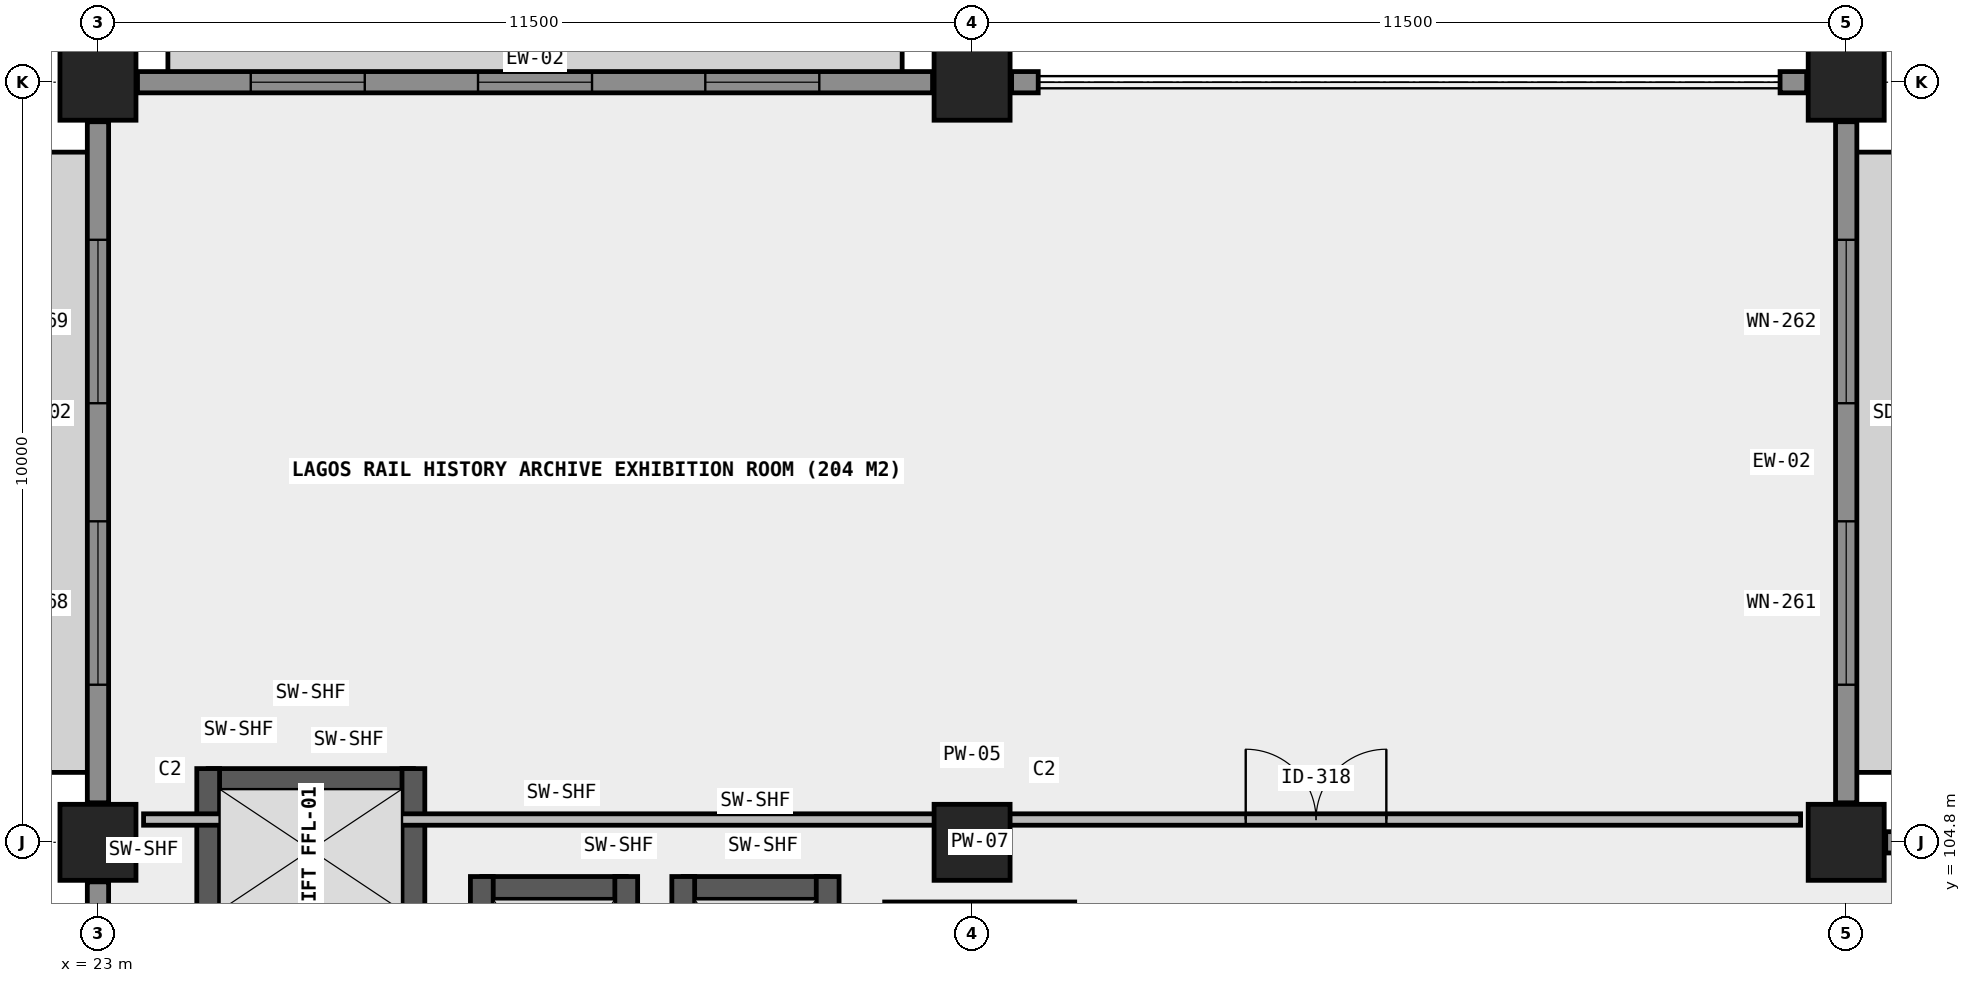
"""IFC4 building model, lengths in metres.
Left out: names, types, materials, properties, quantities, classifications, styles, units other than length and angle.
Written with IfcOpenShell. Run it as: python <this file> out.ifc"""

import sys

from ifc_helpers import new_model, si_unit, direction, frame, frame_2d, origin, origin_2d, place, context, subcontext, project, spatial, rectangle, extrude, element, fill, save


model = new_model("IFC4")
c1 = context("Model", 3, precision=1e-05, world=origin(), true_north=direction((0.0, 1.0)))
c2 = subcontext(c1, "Body", "Model", "MODEL_VIEW")
j1 = project(units=[si_unit("LENGTHUNIT", "METRE"), si_unit("PLANEANGLEUNIT", "RADIAN")], contexts=[c1])
p1 = place(None, origin())
s1 = spatial("IfcSite", under=j1, at=p1, CompositionType="ELEMENT")
p2 = place(p1, origin())
s2 = spatial("IfcBuilding", under=s1, at=p2, CompositionType="ELEMENT")
p3 = place(p2, frame((0.0, 0.0, 8.4)))
s3 = spatial("IfcBuildingStorey", under=s2, at=p3, CompositionType="ELEMENT", Elevation=8.4)
for number, where, z_axis, x_axis in (
    (1, (23.0, 104.8, 0.0), (0.0, 0.0, 1.0), (1.0, 0.0, 0.0)),
    (2, (23.0, 114.8, 0.0), (0.0, 0.0, 1.0), (1.0, 0.0, 0.0)),
    (3, (34.5, 104.8, 0.0), (0.0, 0.0, 1.0), (1.0, 0.0, 0.0)),
    (4, (34.5, 114.8, 0.0), (0.0, 0.0, 1.0), (1.0, 0.0, 0.0)),
    (5, (46.0, 104.8, 0.0), (0.0, 0.0, 1.0), (1.0, 0.0, 0.0)),
    (6, (46.0, 114.8, 0.0), (0.0, 0.0, 1.0), (1.0, 0.0, 0.0)),
):
    element("IfcColumn", number, at=place(p3, frame(where, z_axis=z_axis, x_axis=x_axis)), inside=s3, PredefinedType="COLUMN", context=c2, shape_type="SweptSolid", body=[
        extrude(rectangle(XDim=1.0, YDim=1.0, at=origin_2d()), origin(), (0.0, 0.0, 1.0), 5.4),
    ])
p4 = place(p3, frame((24.45, 105.62, 0.0), z_axis=(0.0, 0.0, 1.0), x_axis=(1.0, 0.0, 0.0)))
e7 = element("IfcWall", 7, at=p4, inside=s3, PredefinedType="SHEAR", context=c2, shape_type="SweptSolid", body=[
    extrude(rectangle(XDim=2.7, YDim=0.3, at=frame_2d((1.35, 0.0))), origin(), (0.0, 0.0, 1.0), 5.4),
])
for number, where, z_axis, x_axis in (
    (8, (24.45, 103.63, 0.0), (0.0, 0.0, 1.0), (0.0, 1.0, 0.0)),
    (9, (27.15, 103.63, 0.0), (0.0, 0.0, 1.0), (0.0, 1.0, 0.0)),
):
    element("IfcWall", number, at=place(p3, frame(where, z_axis=z_axis, x_axis=x_axis)), inside=s3, PredefinedType="SHEAR", context=c2, shape_type="SweptSolid", body=[
        extrude(rectangle(XDim=2.14, YDim=0.3, at=frame_2d((1.07, 0.0))), origin(), (0.0, 0.0, 1.0), 5.4),
    ])
p5 = place(p3, frame((28.05, 104.2, 0.0), z_axis=(0.0, 0.0, 1.0), x_axis=(1.0, 0.0, 0.0)))
e10 = element("IfcWall", 10, at=p5, inside=s3, PredefinedType="SHEAR", context=c2, shape_type="SweptSolid", body=[
    extrude(rectangle(XDim=1.9, YDim=0.3, at=frame_2d((0.95, 0.0))), origin(), (0.0, 0.0, 1.0), 5.4),
])
for number, where, z_axis, x_axis in (
    (11, (28.05, 101.35, 0.0), (0.0, 0.0, 1.0), (0.0, 1.0, 0.0)),
    (12, (29.95, 101.35, 0.0), (0.0, 0.0, 1.0), (0.0, 1.0, 0.0)),
):
    element("IfcWall", number, at=place(p3, frame(where, z_axis=z_axis, x_axis=x_axis)), inside=s3, PredefinedType="SHEAR", context=c2, shape_type="SweptSolid", body=[
        extrude(rectangle(XDim=3.0, YDim=0.3, at=frame_2d((1.5, 0.0))), origin(), (0.0, 0.0, 1.0), 5.4),
    ])
p6 = place(p3, frame((30.7, 104.2, 0.0), z_axis=(0.0, 0.0, 1.0), x_axis=(1.0, 0.0, 0.0)))
e13 = element("IfcWall", 13, at=p6, inside=s3, PredefinedType="SHEAR", context=c2, shape_type="SweptSolid", body=[
    extrude(rectangle(XDim=1.9, YDim=0.3, at=frame_2d((0.95, 0.0))), origin(), (0.0, 0.0, 1.0), 5.4),
])
for number, where, z_axis, x_axis in (
    (14, (30.7, 101.35, 0.0), (0.0, 0.0, 1.0), (0.0, 1.0, 0.0)),
    (15, (32.6, 101.35, 0.0), (0.0, 0.0, 1.0), (0.0, 1.0, 0.0)),
):
    element("IfcWall", number, at=place(p3, frame(where, z_axis=z_axis, x_axis=x_axis)), inside=s3, PredefinedType="SHEAR", context=c2, shape_type="SweptSolid", body=[
        extrude(rectangle(XDim=3.0, YDim=0.3, at=frame_2d((1.5, 0.0))), origin(), (0.0, 0.0, 1.0), 5.4),
    ])
p7 = place(p3, frame((46.52, 104.8, 0.0), z_axis=(0.0, 0.0, 1.0), x_axis=(1.0, 0.0, 0.0)))
e16 = element("IfcWall", 16, at=p7, inside=s3, PredefinedType="SOLIDWALL", context=c2, shape_type="SweptSolid", body=[
    extrude(rectangle(XDim=10.46, YDim=0.28, at=frame_2d((5.23, 0.0))), origin(), (0.0, 0.0, 1.0), 4.35),
])
p8 = place(p7, frame((1.002, 0.0, 0.85)))
e17 = element("IfcOpeningElement", 17, at=p8, cuts=e16, PredefinedType="OPENING", context=c2, shape_type="SweptSolid", body=[
    extrude(rectangle(XDim=2.15, YDim=1.95, at=frame_2d((1.075, 0.975))), frame((0.0, 0.15, 0.0), z_axis=(0.0, -1.0, 0.0), x_axis=(1.0, 0.0, 0.0)), (0.0, 0.0, 1.0), 0.3),
])
p9 = place(p7, frame((4.155, 0.0, 0.85)))
e18 = element("IfcOpeningElement", 18, at=p9, cuts=e16, PredefinedType="OPENING", context=c2, shape_type="SweptSolid", body=[
    extrude(rectangle(XDim=2.15, YDim=1.95, at=frame_2d((1.075, 0.975))), frame((0.0, 0.15, 0.0), z_axis=(0.0, -1.0, 0.0), x_axis=(1.0, 0.0, 0.0)), (0.0, 0.0, 1.0), 0.3),
])
p10 = place(p7, frame((7.308, 0.0, 0.85)))
e19 = element("IfcOpeningElement", 19, at=p10, cuts=e16, PredefinedType="OPENING", context=c2, shape_type="SweptSolid", body=[
    extrude(rectangle(XDim=2.15, YDim=1.95, at=frame_2d((1.075, 0.975))), frame((0.0, 0.15, 0.0), z_axis=(0.0, -1.0, 0.0), x_axis=(1.0, 0.0, 0.0)), (0.0, 0.0, 1.0), 0.3),
])
p11 = place(p3, frame((46.0, 105.32, 0.0), z_axis=(0.0, 0.0, 1.0), x_axis=(0.0, 1.0, 0.0)))
e20 = element("IfcWall", 20, at=p11, inside=s3, PredefinedType="SOLIDWALL", context=c2, shape_type="SweptSolid", body=[
    extrude(rectangle(XDim=8.96, YDim=0.28, at=frame_2d((4.48, 0.0))), origin(), (0.0, 0.0, 1.0), 4.35),
])
p12 = place(p11, frame((1.553, 0.0, 0.85)))
e21 = element("IfcOpeningElement", 21, at=p12, cuts=e20, PredefinedType="OPENING", context=c2, shape_type="SweptSolid", body=[
    extrude(rectangle(XDim=2.15, YDim=1.95, at=frame_2d((1.075, 0.975))), frame((0.0, 0.15, 0.0), z_axis=(0.0, -1.0, 0.0), x_axis=(1.0, 0.0, 0.0)), (0.0, 0.0, 1.0), 0.3),
])
p13 = place(p11, frame((5.257, 0.0, 0.85)))
e22 = element("IfcOpeningElement", 22, at=p13, cuts=e20, PredefinedType="OPENING", context=c2, shape_type="SweptSolid", body=[
    extrude(rectangle(XDim=2.15, YDim=1.95, at=frame_2d((1.075, 0.975))), frame((0.0, 0.15, 0.0), z_axis=(0.0, -1.0, 0.0), x_axis=(1.0, 0.0, 0.0)), (0.0, 0.0, 1.0), 0.3),
])
p14 = place(p3, frame((23.52, 114.8, 0.0), z_axis=(0.0, 0.0, 1.0), x_axis=(1.0, 0.0, 0.0)))
e23 = element("IfcWall", 23, at=p14, inside=s3, PredefinedType="SOLIDWALL", context=c2, shape_type="SweptSolid", body=[
    extrude(rectangle(XDim=10.46, YDim=0.28, at=frame_2d((5.23, 0.0))), origin(), (0.0, 0.0, 1.0), 4.35),
])
p15 = place(p14, frame((1.49, 0.0, 0.85)))
e24 = element("IfcOpeningElement", 24, at=p15, cuts=e23, PredefinedType="OPENING", context=c2, shape_type="SweptSolid", body=[
    extrude(rectangle(XDim=1.5, YDim=2.15, at=frame_2d((0.75, 1.075))), frame((0.0, 0.15, 0.0), z_axis=(0.0, -1.0, 0.0), x_axis=(1.0, 0.0, 0.0)), (0.0, 0.0, 1.0), 0.3),
])
p16 = place(p14, frame((4.48, 0.0, 0.85)))
e25 = element("IfcOpeningElement", 25, at=p16, cuts=e23, PredefinedType="OPENING", context=c2, shape_type="SweptSolid", body=[
    extrude(rectangle(XDim=1.5, YDim=2.15, at=frame_2d((0.75, 1.075))), frame((0.0, 0.15, 0.0), z_axis=(0.0, -1.0, 0.0), x_axis=(1.0, 0.0, 0.0)), (0.0, 0.0, 1.0), 0.3),
])
p17 = place(p14, frame((7.47, 0.0, 0.85)))
e26 = element("IfcOpeningElement", 26, at=p17, cuts=e23, PredefinedType="OPENING", context=c2, shape_type="SweptSolid", body=[
    extrude(rectangle(XDim=1.5, YDim=2.15, at=frame_2d((0.75, 1.075))), frame((0.0, 0.15, 0.0), z_axis=(0.0, -1.0, 0.0), x_axis=(1.0, 0.0, 0.0)), (0.0, 0.0, 1.0), 0.3),
])
for number, where, z_axis, x_axis in (
    (27, (35.02, 114.8, 0.0), (0.0, 0.0, 1.0), (1.0, 0.0, 0.0)),
    (28, (45.13, 114.8, 0.0), (0.0, 0.0, 1.0), (1.0, 0.0, 0.0)),
):
    element("IfcWall", number, at=place(p3, frame(where, z_axis=z_axis, x_axis=x_axis)), inside=s3, PredefinedType="SOLIDWALL", context=c2, shape_type="SweptSolid", body=[
        extrude(rectangle(XDim=0.35, YDim=0.28, at=frame_2d((0.175, 0.0))), origin(), (0.0, 0.0, 1.0), 5.13),
    ])
p18 = place(p3, frame((23.0, 95.32, 0.0), z_axis=(0.0, 0.0, 1.0), x_axis=(0.0, 1.0, 0.0)))
e29 = element("IfcWall", 29, at=p18, inside=s3, PredefinedType="SOLIDWALL", context=c2, shape_type="SweptSolid", body=[
    extrude(rectangle(XDim=8.96, YDim=0.28, at=frame_2d((4.48, 0.0))), origin(), (0.0, 0.0, 1.0), 4.35),
])
p19 = place(p18, frame((1.553, 0.0, 0.85)))
e30 = element("IfcOpeningElement", 30, at=p19, cuts=e29, PredefinedType="OPENING", context=c2, shape_type="SweptSolid", body=[
    extrude(rectangle(XDim=2.15, YDim=1.95, at=frame_2d((1.075, 0.975))), frame((0.0, 0.15, 0.0), z_axis=(0.0, -1.0, 0.0), x_axis=(1.0, 0.0, 0.0)), (0.0, 0.0, 1.0), 0.3),
])
p20 = place(p18, frame((5.257, 0.0, 0.85)))
e31 = element("IfcOpeningElement", 31, at=p20, cuts=e29, PredefinedType="OPENING", context=c2, shape_type="SweptSolid", body=[
    extrude(rectangle(XDim=2.15, YDim=1.95, at=frame_2d((1.075, 0.975))), frame((0.0, 0.15, 0.0), z_axis=(0.0, -1.0, 0.0), x_axis=(1.0, 0.0, 0.0)), (0.0, 0.0, 1.0), 0.3),
])
p21 = place(p3, frame((23.0, 105.32, 0.0), z_axis=(0.0, 0.0, 1.0), x_axis=(0.0, 1.0, 0.0)))
e32 = element("IfcWall", 32, at=p21, inside=s3, PredefinedType="SOLIDWALL", context=c2, shape_type="SweptSolid", body=[
    extrude(rectangle(XDim=8.96, YDim=0.28, at=frame_2d((4.48, 0.0))), origin(), (0.0, 0.0, 1.0), 4.35),
])
p22 = place(p21, frame((1.553, 0.0, 0.85)))
e33 = element("IfcOpeningElement", 33, at=p22, cuts=e32, PredefinedType="OPENING", context=c2, shape_type="SweptSolid", body=[
    extrude(rectangle(XDim=2.15, YDim=1.95, at=frame_2d((1.075, 0.975))), frame((0.0, 0.15, 0.0), z_axis=(0.0, -1.0, 0.0), x_axis=(1.0, 0.0, 0.0)), (0.0, 0.0, 1.0), 0.3),
])
p23 = place(p21, frame((5.257, 0.0, 0.85)))
e34 = element("IfcOpeningElement", 34, at=p23, cuts=e32, PredefinedType="OPENING", context=c2, shape_type="SweptSolid", body=[
    extrude(rectangle(XDim=2.15, YDim=1.95, at=frame_2d((1.075, 0.975))), frame((0.0, 0.15, 0.0), z_axis=(0.0, -1.0, 0.0), x_axis=(1.0, 0.0, 0.0)), (0.0, 0.0, 1.0), 0.3),
])
p24 = place(p3, frame((33.35, 103.95, 0.0), z_axis=(0.0, 0.0, 1.0), x_axis=(1.0, 0.0, 0.0)))
e35 = element("IfcWall", 35, at=p24, inside=s3, PredefinedType="PLUMBINGWALL", context=c2, shape_type="SweptSolid", body=[
    extrude(rectangle(XDim=2.5, YDim=0.13, at=frame_2d((1.25, 0.0))), origin(), (0.0, 0.0, 1.0), 5.12),
])
p25 = place(p3, frame((23.6, 105.1, 0.0), z_axis=(0.0, 0.0, 1.0), x_axis=(1.0, 0.0, 0.0)))
e36 = element("IfcWall", 36, at=p25, inside=s3, PredefinedType="PARTITIONING", context=c2, shape_type="SweptSolid", body=[
    extrude(rectangle(XDim=21.8, YDim=0.15, at=frame_2d((10.9, 0.0))), origin(), (0.0, 0.0, 1.0), 5.12),
])
p26 = place(p25, frame((14.5, 0.0, 0.0)))
e37 = element("IfcOpeningElement", 37, at=p26, cuts=e36, PredefinedType="OPENING", context=c2, shape_type="SweptSolid", body=[
    extrude(rectangle(XDim=1.85, YDim=2.25, at=frame_2d((0.925, 1.125))), frame((0.0, 0.085, 0.0), z_axis=(0.0, -1.0, 0.0), x_axis=(1.0, 0.0, 0.0)), (0.0, 0.0, 1.0), 0.17),
])
p27 = place(p12, origin())
e38 = element("IfcWindow", 38, at=p27, inside=s3, PartitioningType="SINGLE_PANEL", PredefinedType="WINDOW", context=c2, shape_type="SweptSolid", body=[
    extrude(rectangle(XDim=2.15, YDim=1.95, at=frame_2d((1.075, 0.975))), frame((0.0, 0.03, 0.0), z_axis=(0.0, -1.0, 0.0), x_axis=(1.0, 0.0, 0.0)), (0.0, 0.0, 1.0), 0.06),
])
fill(e21, e38)
p28 = place(p13, origin())
e39 = element("IfcWindow", 39, at=p28, inside=s3, PartitioningType="SINGLE_PANEL", PredefinedType="WINDOW", context=c2, shape_type="SweptSolid", body=[
    extrude(rectangle(XDim=2.15, YDim=1.95, at=frame_2d((1.075, 0.975))), frame((0.0, 0.03, 0.0), z_axis=(0.0, -1.0, 0.0), x_axis=(1.0, 0.0, 0.0)), (0.0, 0.0, 1.0), 0.06),
])
fill(e22, e39)
p29 = place(p15, origin())
e40 = element("IfcWindow", 40, at=p29, inside=s3, PartitioningType="SINGLE_PANEL", PredefinedType="WINDOW", context=c2, shape_type="SweptSolid", body=[
    extrude(rectangle(XDim=1.5, YDim=2.15, at=frame_2d((0.75, 1.075))), frame((0.0, 0.03, 0.0), z_axis=(0.0, -1.0, 0.0), x_axis=(1.0, 0.0, 0.0)), (0.0, 0.0, 1.0), 0.06),
])
fill(e24, e40)
p30 = place(p16, origin())
e41 = element("IfcWindow", 41, at=p30, inside=s3, PartitioningType="SINGLE_PANEL", PredefinedType="WINDOW", context=c2, shape_type="SweptSolid", body=[
    extrude(rectangle(XDim=1.5, YDim=2.15, at=frame_2d((0.75, 1.075))), frame((0.0, 0.03, 0.0), z_axis=(0.0, -1.0, 0.0), x_axis=(1.0, 0.0, 0.0)), (0.0, 0.0, 1.0), 0.06),
])
fill(e25, e41)
p31 = place(p17, origin())
e42 = element("IfcWindow", 42, at=p31, inside=s3, PartitioningType="SINGLE_PANEL", PredefinedType="WINDOW", context=c2, shape_type="SweptSolid", body=[
    extrude(rectangle(XDim=1.5, YDim=2.15, at=frame_2d((0.75, 1.075))), frame((0.0, 0.03, 0.0), z_axis=(0.0, -1.0, 0.0), x_axis=(1.0, 0.0, 0.0)), (0.0, 0.0, 1.0), 0.06),
])
fill(e26, e42)
p32 = place(p22, origin())
e43 = element("IfcWindow", 43, at=p32, inside=s3, PartitioningType="SINGLE_PANEL", PredefinedType="WINDOW", context=c2, shape_type="SweptSolid", body=[
    extrude(rectangle(XDim=2.15, YDim=1.95, at=frame_2d((1.075, 0.975))), frame((0.0, 0.03, 0.0), z_axis=(0.0, -1.0, 0.0), x_axis=(1.0, 0.0, 0.0)), (0.0, 0.0, 1.0), 0.06),
])
fill(e33, e43)
p33 = place(p23, origin())
e44 = element("IfcWindow", 44, at=p33, inside=s3, PartitioningType="SINGLE_PANEL", PredefinedType="WINDOW", context=c2, shape_type="SweptSolid", body=[
    extrude(rectangle(XDim=2.15, YDim=1.95, at=frame_2d((1.075, 0.975))), frame((0.0, 0.03, 0.0), z_axis=(0.0, -1.0, 0.0), x_axis=(1.0, 0.0, 0.0)), (0.0, 0.0, 1.0), 0.06),
])
fill(e34, e44)
p34 = place(p26, origin())
e45 = element("IfcDoor", 45, at=p34, inside=s3, OperationType="DOUBLE_DOOR_SINGLE_SWING", PredefinedType="DOOR", context=c2, shape_type="SweptSolid", body=[
    extrude(rectangle(XDim=1.85, YDim=2.25, at=frame_2d((0.925, 1.125))), frame((0.0, 0.025, 0.0), z_axis=(0.0, -1.0, 0.0), x_axis=(1.0, 0.0, 0.0)), (0.0, 0.0, 1.0), 0.05),
])
fill(e37, e45)
save(model, sys.argv[1])
